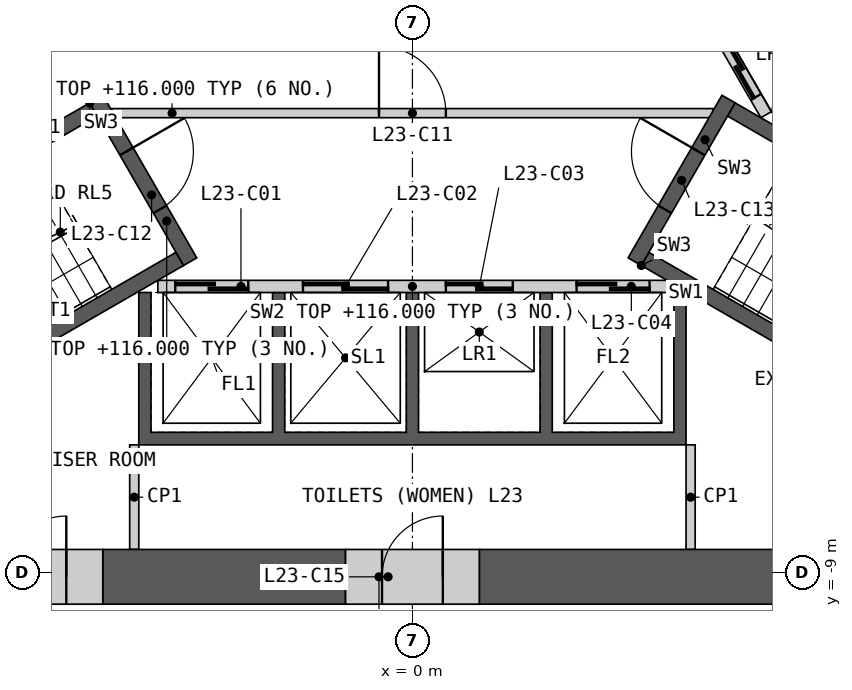
"""IFC4 building model, lengths in metres.
Left out: names, types, materials, properties, quantities, classifications, styles, units other than length and angle.
Written with IfcOpenShell. Run it as: python <this file> out.ifc"""

import sys

from ifc_helpers import new_model, si_unit, direction, frame, frame_2d, origin, place, context, subcontext, project, spatial, polyline, rectangle, outline, extrude, element, fill, save


model = new_model("IFC4")
c1 = context("Model", 3, precision=1e-05, world=origin(), true_north=direction((0.0, 1.0)))
c2 = subcontext(c1, "Body", "Model", "MODEL_VIEW")
j1 = project(units=[si_unit("LENGTHUNIT", "METRE"), si_unit("PLANEANGLEUNIT", "RADIAN")], contexts=[c1])
p1 = place(None, origin())
s1 = spatial("IfcSite", under=j1, at=p1, CompositionType="ELEMENT")
p2 = place(p1, origin())
s2 = spatial("IfcBuilding", under=s1, at=p2, CompositionType="ELEMENT")
p3 = place(p2, frame((0.0, 0.0, 112.2)))
s3 = spatial("IfcBuildingStorey", under=s2, at=p3, CompositionType="ELEMENT", Elevation=112.2)
p4 = place(p3, origin())
e1 = element("IfcWall", 1, at=p4, inside=s3, PredefinedType="SHEAR", context=c2, shape_type="SweptSolid", body=[
    extrude(outline(polyline([(4.5, -4.4), (4.5, -6.906), (-4.5, -6.906), (-4.5, -4.4), (-4.3, -4.4), (-4.3, -6.7), (-2.3, -6.7), (-2.3, -4.4), (-2.1, -4.4), (-2.1, -6.7), (-0.1, -6.7), (-0.1, -4.4), (0.1, -4.4), (0.1, -6.7), (2.1, -6.7), (2.1, -4.4), (2.3, -4.4), (2.3, -6.7), (4.3, -6.7), (4.3, -4.4), (4.5, -4.4)])), origin(), (0.0, 0.0, 1.0), 3.8),
])
p5 = place(p3, frame((-4.187, -4.3, 0.0), z_axis=(0.0, 0.0, 1.0), x_axis=(1.0, 0.0, 0.0)))
e2 = element("IfcWall", 2, at=p5, inside=s3, PredefinedType="SOLIDWALL", context=c2, shape_type="SweptSolid", body=[
    extrude(rectangle(XDim=8.373, YDim=0.2, at=frame_2d((4.187, 0.0))), origin(), (0.0, 0.0, 1.0), 3.8),
])
p6 = place(p5, frame((0.287, 0.0, 0.0)))
e3 = element("IfcOpeningElement", 3, at=p6, cuts=e2, PredefinedType="OPENING", context=c2, shape_type="SweptSolid", body=[
    extrude(rectangle(XDim=1.2, YDim=2.1, at=frame_2d((0.6, 1.05))), frame((0.0, 0.11, 0.0), z_axis=(0.0, -1.0, 0.0), x_axis=(1.0, 0.0, 0.0)), (0.0, 0.0, 1.0), 0.22),
])
p7 = place(p5, frame((2.387, 0.0, 0.0)))
e4 = element("IfcOpeningElement", 4, at=p7, cuts=e2, PredefinedType="OPENING", context=c2, shape_type="SweptSolid", body=[
    extrude(rectangle(XDim=1.4, YDim=2.1, at=frame_2d((0.7, 1.05))), frame((0.0, 0.11, 0.0), z_axis=(0.0, -1.0, 0.0), x_axis=(1.0, 0.0, 0.0)), (0.0, 0.0, 1.0), 0.22),
])
p8 = place(p5, frame((4.737, 0.0, 0.0)))
e5 = element("IfcOpeningElement", 5, at=p8, cuts=e2, PredefinedType="OPENING", context=c2, shape_type="SweptSolid", body=[
    extrude(rectangle(XDim=1.1, YDim=2.1, at=frame_2d((0.55, 1.05))), frame((0.0, 0.11, 0.0), z_axis=(0.0, -1.0, 0.0), x_axis=(1.0, 0.0, 0.0)), (0.0, 0.0, 1.0), 0.22),
])
p9 = place(p5, frame((6.887, 0.0, 0.0)))
e6 = element("IfcOpeningElement", 6, at=p9, cuts=e2, PredefinedType="OPENING", context=c2, shape_type="SweptSolid", body=[
    extrude(rectangle(XDim=1.2, YDim=2.1, at=frame_2d((0.6, 1.05))), frame((0.0, 0.11, 0.0), z_axis=(0.0, -1.0, 0.0), x_axis=(1.0, 0.0, 0.0)), (0.0, 0.0, 1.0), 0.22),
])
p10 = place(p3, origin())
e7 = element("IfcWall", 7, at=p10, inside=s3, PredefinedType="SHEAR", context=c2, shape_type="SweptSolid", body=[
    extrude(outline(polyline([(2.66, 4.192), (4.831, 5.445), (8.231, -0.444), (6.061, -1.697), (5.96, -1.524), (7.952, -0.374), (6.952, 1.358), (4.96, 0.208), (4.861, 0.381), (6.852, 1.531), (5.852, 3.263), (3.861, 2.113), (3.76, 2.287), (5.752, 3.437), (4.752, 5.169), (2.76, 4.019), (2.66, 4.192)])), origin(), (0.0, 0.0, 1.0), 3.8),
])
p11 = place(p3, frame((5.817, -1.476, 0.0), z_axis=(0.0, 0.0, 1.0), x_axis=(-0.500002616675, 0.866023893041, 0.0)))
e8 = element("IfcWall", 8, at=p11, inside=s3, PredefinedType="SOLIDWALL", context=c2, shape_type="SweptSolid", body=[
    extrude(rectangle(XDim=8.373, YDim=0.2, at=frame_2d((4.187, 0.0))), origin(), (0.0, 0.0, 1.0), 3.8),
])
p12 = place(p11, frame((0.337, 0.0, 0.0)))
e9 = element("IfcOpeningElement", 9, at=p12, cuts=e8, PredefinedType="OPENING", context=c2, shape_type="SweptSolid", body=[
    extrude(rectangle(XDim=1.1, YDim=2.1, at=frame_2d((0.55, 1.05))), frame((0.0, 0.11, 0.0), z_axis=(0.0, -1.0, 0.0), x_axis=(1.0, 0.0, 0.0)), (0.0, 0.0, 1.0), 0.22),
])
p13 = place(p11, frame((2.537, 0.0, 0.0)))
e10 = element("IfcOpeningElement", 10, at=p13, cuts=e8, PredefinedType="OPENING", context=c2, shape_type="SweptSolid", body=[
    extrude(rectangle(XDim=1.1, YDim=2.1, at=frame_2d((0.55, 1.05))), frame((0.0, 0.11, 0.0), z_axis=(0.0, -1.0, 0.0), x_axis=(1.0, 0.0, 0.0)), (0.0, 0.0, 1.0), 0.22),
])
p14 = place(p11, frame((4.737, 0.0, 0.0)))
e11 = element("IfcOpeningElement", 11, at=p14, cuts=e8, PredefinedType="OPENING", context=c2, shape_type="SweptSolid", body=[
    extrude(rectangle(XDim=1.1, YDim=2.1, at=frame_2d((0.55, 1.05))), frame((0.0, 0.11, 0.0), z_axis=(0.0, -1.0, 0.0), x_axis=(1.0, 0.0, 0.0)), (0.0, 0.0, 1.0), 0.22),
])
p15 = place(p11, frame((7.037, 0.0, 0.0)))
e12 = element("IfcOpeningElement", 12, at=p15, cuts=e8, PredefinedType="OPENING", context=c2, shape_type="SweptSolid", body=[
    extrude(rectangle(XDim=0.9, YDim=2.1, at=frame_2d((0.45, 1.05))), frame((0.0, 0.11, 0.0), z_axis=(0.0, -1.0, 0.0), x_axis=(1.0, 0.0, 0.0)), (0.0, 0.0, 1.0), 0.22),
])
p16 = place(p3, frame((-4.941, -1.45, 0.0), z_axis=(0.0, 0.0, 1.0), x_axis=(1.0, 0.0, 0.0)))
e13 = element("IfcWall", 13, at=p16, inside=s3, PredefinedType="PARTITIONING", context=c2, shape_type="SweptSolid", body=[
    extrude(rectangle(XDim=9.882, YDim=0.15, at=frame_2d((4.941, 0.0))), origin(), (0.0, 0.0, 1.0), 3.8),
])
p17 = place(p16, frame((4.391, 0.0, 0.0)))
e14 = element("IfcOpeningElement", 14, at=p17, cuts=e13, PredefinedType="OPENING", context=c2, shape_type="SweptSolid", body=[
    extrude(rectangle(XDim=1.1, YDim=2.1, at=frame_2d((0.55, 1.05))), frame((0.0, 0.085, 0.0), z_axis=(0.0, -1.0, 0.0), x_axis=(1.0, 0.0, 0.0)), (0.0, 0.0, 1.0), 0.17),
])
p18 = place(p3, origin())
e15 = element("IfcWall", 15, at=p18, inside=s3, PredefinedType="SHEAR", context=c2, shape_type="SweptSolid", body=[
    extrude(outline(polyline([(-5.307, -1.281), (-10.374, -4.206), (-10.032, -4.298), (-5.182, -1.498), (-5.307, -1.281)])), origin(), (0.0, 0.0, 1.0), 3.8),
])
p19 = place(p3, origin())
e16 = element("IfcWall", 16, at=p19, inside=s3, PredefinedType="SHEAR", context=c2, shape_type="SweptSolid", body=[
    extrude(outline(polyline([(-8.738, -6.539), (-8.83, -6.881), (-3.763, -3.956), (-3.888, -3.739), (-8.738, -6.539)])), origin(), (0.0, 0.0, 1.0), 3.8),
])
p20 = place(p3, frame((-5.199, -1.219, 0.0), z_axis=(0.0, 0.0, 1.0), x_axis=(0.499982516597, -0.866035497597, 0.0)))
e17 = element("IfcWall", 17, at=p20, inside=s3, PredefinedType="SHEAR", context=c2, shape_type="SweptSolid", body=[
    extrude(rectangle(XDim=3.088, YDim=0.25, at=frame_2d((1.544, 0.0))), origin(), (0.0, 0.0, 1.0), 3.8),
])
p21 = place(p20, frame((0.994, 0.0, 0.0)))
e18 = element("IfcOpeningElement", 18, at=p21, cuts=e17, PredefinedType="OPENING", context=c2, shape_type="SweptSolid", body=[
    extrude(rectangle(XDim=1.1, YDim=2.1, at=frame_2d((0.55, 1.05))), frame((0.0, 0.135, 0.0), z_axis=(0.0, -1.0, 0.0), x_axis=(1.0, 0.0, 0.0)), (0.0, 0.0, 1.0), 0.27),
])
p22 = place(p3, origin())
e19 = element("IfcWall", 19, at=p22, inside=s3, PredefinedType="SHEAR", context=c2, shape_type="SweptSolid", body=[
    extrude(outline(polyline([(3.763, -3.956), (8.83, -6.881), (8.738, -6.539), (3.888, -3.739), (3.763, -3.956)])), origin(), (0.0, 0.0, 1.0), 3.8),
])
p23 = place(p3, origin())
e20 = element("IfcWall", 20, at=p23, inside=s3, PredefinedType="SHEAR", context=c2, shape_type="SweptSolid", body=[
    extrude(outline(polyline([(10.032, -4.298), (10.374, -4.206), (5.307, -1.281), (5.182, -1.498), (10.032, -4.298)])), origin(), (0.0, 0.0, 1.0), 3.8),
])
p24 = place(p3, frame((3.655, -3.893, 0.0), z_axis=(0.0, 0.0, 1.0), x_axis=(0.499982516597, 0.866035497597, 0.0)))
e21 = element("IfcWall", 21, at=p24, inside=s3, PredefinedType="SHEAR", context=c2, shape_type="SweptSolid", body=[
    extrude(rectangle(XDim=3.088, YDim=0.25, at=frame_2d((1.544, 0.0))), origin(), (0.0, 0.0, 1.0), 3.8),
])
p25 = place(p24, frame((0.994, 0.0, 0.0)))
e22 = element("IfcOpeningElement", 22, at=p25, cuts=e21, PredefinedType="OPENING", context=c2, shape_type="SweptSolid", body=[
    extrude(rectangle(XDim=1.1, YDim=2.1, at=frame_2d((0.55, 1.05))), frame((0.0, 0.135, 0.0), z_axis=(0.0, -1.0, 0.0), x_axis=(1.0, 0.0, 0.0)), (0.0, 0.0, 1.0), 0.27),
])
for number, where, z_axis, x_axis in (
    (23, (4.575, -6.906, 0.0), (0.0, 0.0, 1.0), (0.0, -1.0, 0.0)),
    (24, (-4.575, -6.906, 0.0), (0.0, 0.0, 1.0), (0.0, -1.0, 0.0)),
):
    element("IfcWall", number, at=place(p3, frame(where, z_axis=z_axis, x_axis=x_axis)), inside=s3, PredefinedType="PARTITIONING", context=c2, shape_type="SweptSolid", body=[
        extrude(rectangle(XDim=1.72, YDim=0.15, at=frame_2d((0.86, 0.0))), origin(), (0.0, 0.0, 1.0), 3.8),
    ])
p26 = place(p3, frame((1.1, -9.076, 0.0), z_axis=(0.0, 0.0, 1.0), x_axis=(1.0, 0.0, 0.0)))
e25 = element("IfcWall", 25, at=p26, inside=s3, PredefinedType="SHEAR", context=c2, shape_type="SweptSolid", body=[
    extrude(rectangle(XDim=7.595, YDim=0.9, at=frame_2d((3.798, 0.0))), origin(), (0.0, 0.0, 1.0), 3.8),
])
p27 = place(p3, frame((-5.093, -9.076, 0.0), z_axis=(0.0, 0.0, 1.0), x_axis=(1.0, 0.0, 0.0)))
e26 = element("IfcWall", 26, at=p27, inside=s3, PredefinedType="SHEAR", context=c2, shape_type="SweptSolid", body=[
    extrude(rectangle(XDim=3.992, YDim=0.9, at=frame_2d((1.996, 0.0))), origin(), (0.0, 0.0, 1.0), 3.8),
])
p28 = place(p3, frame((-1.1, -9.076, 0.0), z_axis=(0.0, 0.0, 1.0), x_axis=(1.0, 0.0, 0.0)))
e27 = element("IfcWall", 27, at=p28, inside=s3, PredefinedType="SHEAR", context=c2, shape_type="SweptSolid", body=[
    extrude(rectangle(XDim=2.2, YDim=0.9, at=frame_2d((1.1, 0.0))), origin(), (0.0, 0.0, 1.0), 3.8),
])
p29 = place(p28, frame((0.6, 0.0, 0.0)))
e28 = element("IfcOpeningElement", 28, at=p29, cuts=e27, PredefinedType="OPENING", context=c2, shape_type="SweptSolid", body=[
    extrude(rectangle(XDim=1.0, YDim=2.1, at=frame_2d((0.5, 1.05))), frame((0.0, 0.46, 0.0), z_axis=(0.0, -1.0, 0.0), x_axis=(1.0, 0.0, 0.0)), (0.0, 0.0, 1.0), 0.92),
])
p30 = place(p3, frame((-7.292, -9.076, 0.0), z_axis=(0.0, 0.0, 1.0), x_axis=(1.0, 0.0, 0.0)))
e29 = element("IfcWall", 29, at=p30, inside=s3, PredefinedType="SHEAR", context=c2, shape_type="SweptSolid", body=[
    extrude(rectangle(XDim=2.2, YDim=0.9, at=frame_2d((1.1, 0.0))), origin(), (0.0, 0.0, 1.0), 3.8),
])
p31 = place(p30, frame((0.6, 0.0, 0.0)))
e30 = element("IfcOpeningElement", 30, at=p31, cuts=e29, PredefinedType="OPENING", context=c2, shape_type="SweptSolid", body=[
    extrude(rectangle(XDim=1.0, YDim=2.1, at=frame_2d((0.5, 1.05))), frame((0.0, 0.46, 0.0), z_axis=(0.0, -1.0, 0.0), x_axis=(1.0, 0.0, 0.0)), (0.0, 0.0, 1.0), 0.92),
])
p32 = place(p6, origin())
e31 = element("IfcDoor", 31, at=p32, inside=s3, OperationType="SLIDING_TO_LEFT", PredefinedType="DOOR", context=c2, shape_type="SweptSolid", body=[
    extrude(rectangle(XDim=1.2, YDim=2.1, at=frame_2d((0.6, 1.05))), frame((0.0, 0.025, 0.0), z_axis=(0.0, -1.0, 0.0), x_axis=(1.0, 0.0, 0.0)), (0.0, 0.0, 1.0), 0.05),
])
fill(e3, e31)
p33 = place(p7, origin())
e32 = element("IfcDoor", 32, at=p33, inside=s3, OperationType="SLIDING_TO_LEFT", PredefinedType="DOOR", context=c2, shape_type="SweptSolid", body=[
    extrude(rectangle(XDim=1.4, YDim=2.1, at=frame_2d((0.7, 1.05))), frame((0.0, 0.025, 0.0), z_axis=(0.0, -1.0, 0.0), x_axis=(1.0, 0.0, 0.0)), (0.0, 0.0, 1.0), 0.05),
])
fill(e4, e32)
p34 = place(p8, origin())
e33 = element("IfcDoor", 33, at=p34, inside=s3, OperationType="SLIDING_TO_LEFT", PredefinedType="DOOR", context=c2, shape_type="SweptSolid", body=[
    extrude(rectangle(XDim=1.1, YDim=2.1, at=frame_2d((0.55, 1.05))), frame((0.0, 0.025, 0.0), z_axis=(0.0, -1.0, 0.0), x_axis=(1.0, 0.0, 0.0)), (0.0, 0.0, 1.0), 0.05),
])
fill(e5, e33)
p35 = place(p9, origin())
e34 = element("IfcDoor", 34, at=p35, inside=s3, OperationType="SLIDING_TO_LEFT", PredefinedType="DOOR", context=c2, shape_type="SweptSolid", body=[
    extrude(rectangle(XDim=1.2, YDim=2.1, at=frame_2d((0.6, 1.05))), frame((0.0, 0.025, 0.0), z_axis=(0.0, -1.0, 0.0), x_axis=(1.0, 0.0, 0.0)), (0.0, 0.0, 1.0), 0.05),
])
fill(e6, e34)
p36 = place(p12, origin())
e35 = element("IfcDoor", 35, at=p36, inside=s3, OperationType="SLIDING_TO_LEFT", PredefinedType="DOOR", context=c2, shape_type="SweptSolid", body=[
    extrude(rectangle(XDim=1.1, YDim=2.1, at=frame_2d((0.55, 1.05))), frame((0.0, 0.025, 0.0), z_axis=(0.0, -1.0, 0.0), x_axis=(1.0, 0.0, 0.0)), (0.0, 0.0, 1.0), 0.05),
])
fill(e9, e35)
p37 = place(p17, origin())
e36 = element("IfcDoor", 36, at=p37, inside=s3, OperationType="SINGLE_SWING_LEFT", PredefinedType="DOOR", context=c2, shape_type="SweptSolid", body=[
    extrude(rectangle(XDim=1.1, YDim=2.1, at=frame_2d((0.55, 1.05))), frame((0.0, 0.025, 0.0), z_axis=(0.0, -1.0, 0.0), x_axis=(1.0, 0.0, 0.0)), (0.0, 0.0, 1.0), 0.05),
])
fill(e14, e36)
p38 = place(p21, origin())
e37 = element("IfcDoor", 37, at=p38, inside=s3, OperationType="SINGLE_SWING_LEFT", PredefinedType="DOOR", context=c2, shape_type="SweptSolid", body=[
    extrude(rectangle(XDim=1.1, YDim=2.1, at=frame_2d((0.55, 1.05))), frame((0.0, 0.025, 0.0), z_axis=(0.0, -1.0, 0.0), x_axis=(1.0, 0.0, 0.0)), (0.0, 0.0, 1.0), 0.05),
])
fill(e18, e37)
p39 = place(p25, origin())
e38 = element("IfcDoor", 38, at=p39, inside=s3, OperationType="SINGLE_SWING_RIGHT", PredefinedType="DOOR", context=c2, shape_type="SweptSolid", body=[
    extrude(rectangle(XDim=1.1, YDim=2.1, at=frame_2d((0.55, 1.05))), frame((0.0, 0.025, 0.0), z_axis=(0.0, -1.0, 0.0), x_axis=(1.0, 0.0, 0.0)), (0.0, 0.0, 1.0), 0.05),
])
fill(e22, e38)
p40 = place(p29, origin())
e39 = element("IfcDoor", 39, at=p40, inside=s3, OperationType="SINGLE_SWING_RIGHT", PredefinedType="DOOR", context=c2, shape_type="SweptSolid", body=[
    extrude(rectangle(XDim=1.0, YDim=2.1, at=frame_2d((0.5, 1.05))), frame((0.0, 0.205, 0.0), z_axis=(0.0, -1.0, 0.0), x_axis=(1.0, 0.0, 0.0)), (0.0, 0.0, 1.0), 0.05),
])
fill(e28, e39)
p41 = place(p31, origin())
e40 = element("IfcDoor", 40, at=p41, inside=s3, OperationType="SINGLE_SWING_RIGHT", PredefinedType="DOOR", context=c2, shape_type="SweptSolid", body=[
    extrude(rectangle(XDim=1.0, YDim=2.1, at=frame_2d((0.5, 1.05))), frame((0.0, 0.205, 0.0), z_axis=(0.0, -1.0, 0.0), x_axis=(1.0, 0.0, 0.0)), (0.0, 0.0, 1.0), 0.05),
])
fill(e30, e40)
save(model, sys.argv[1])
